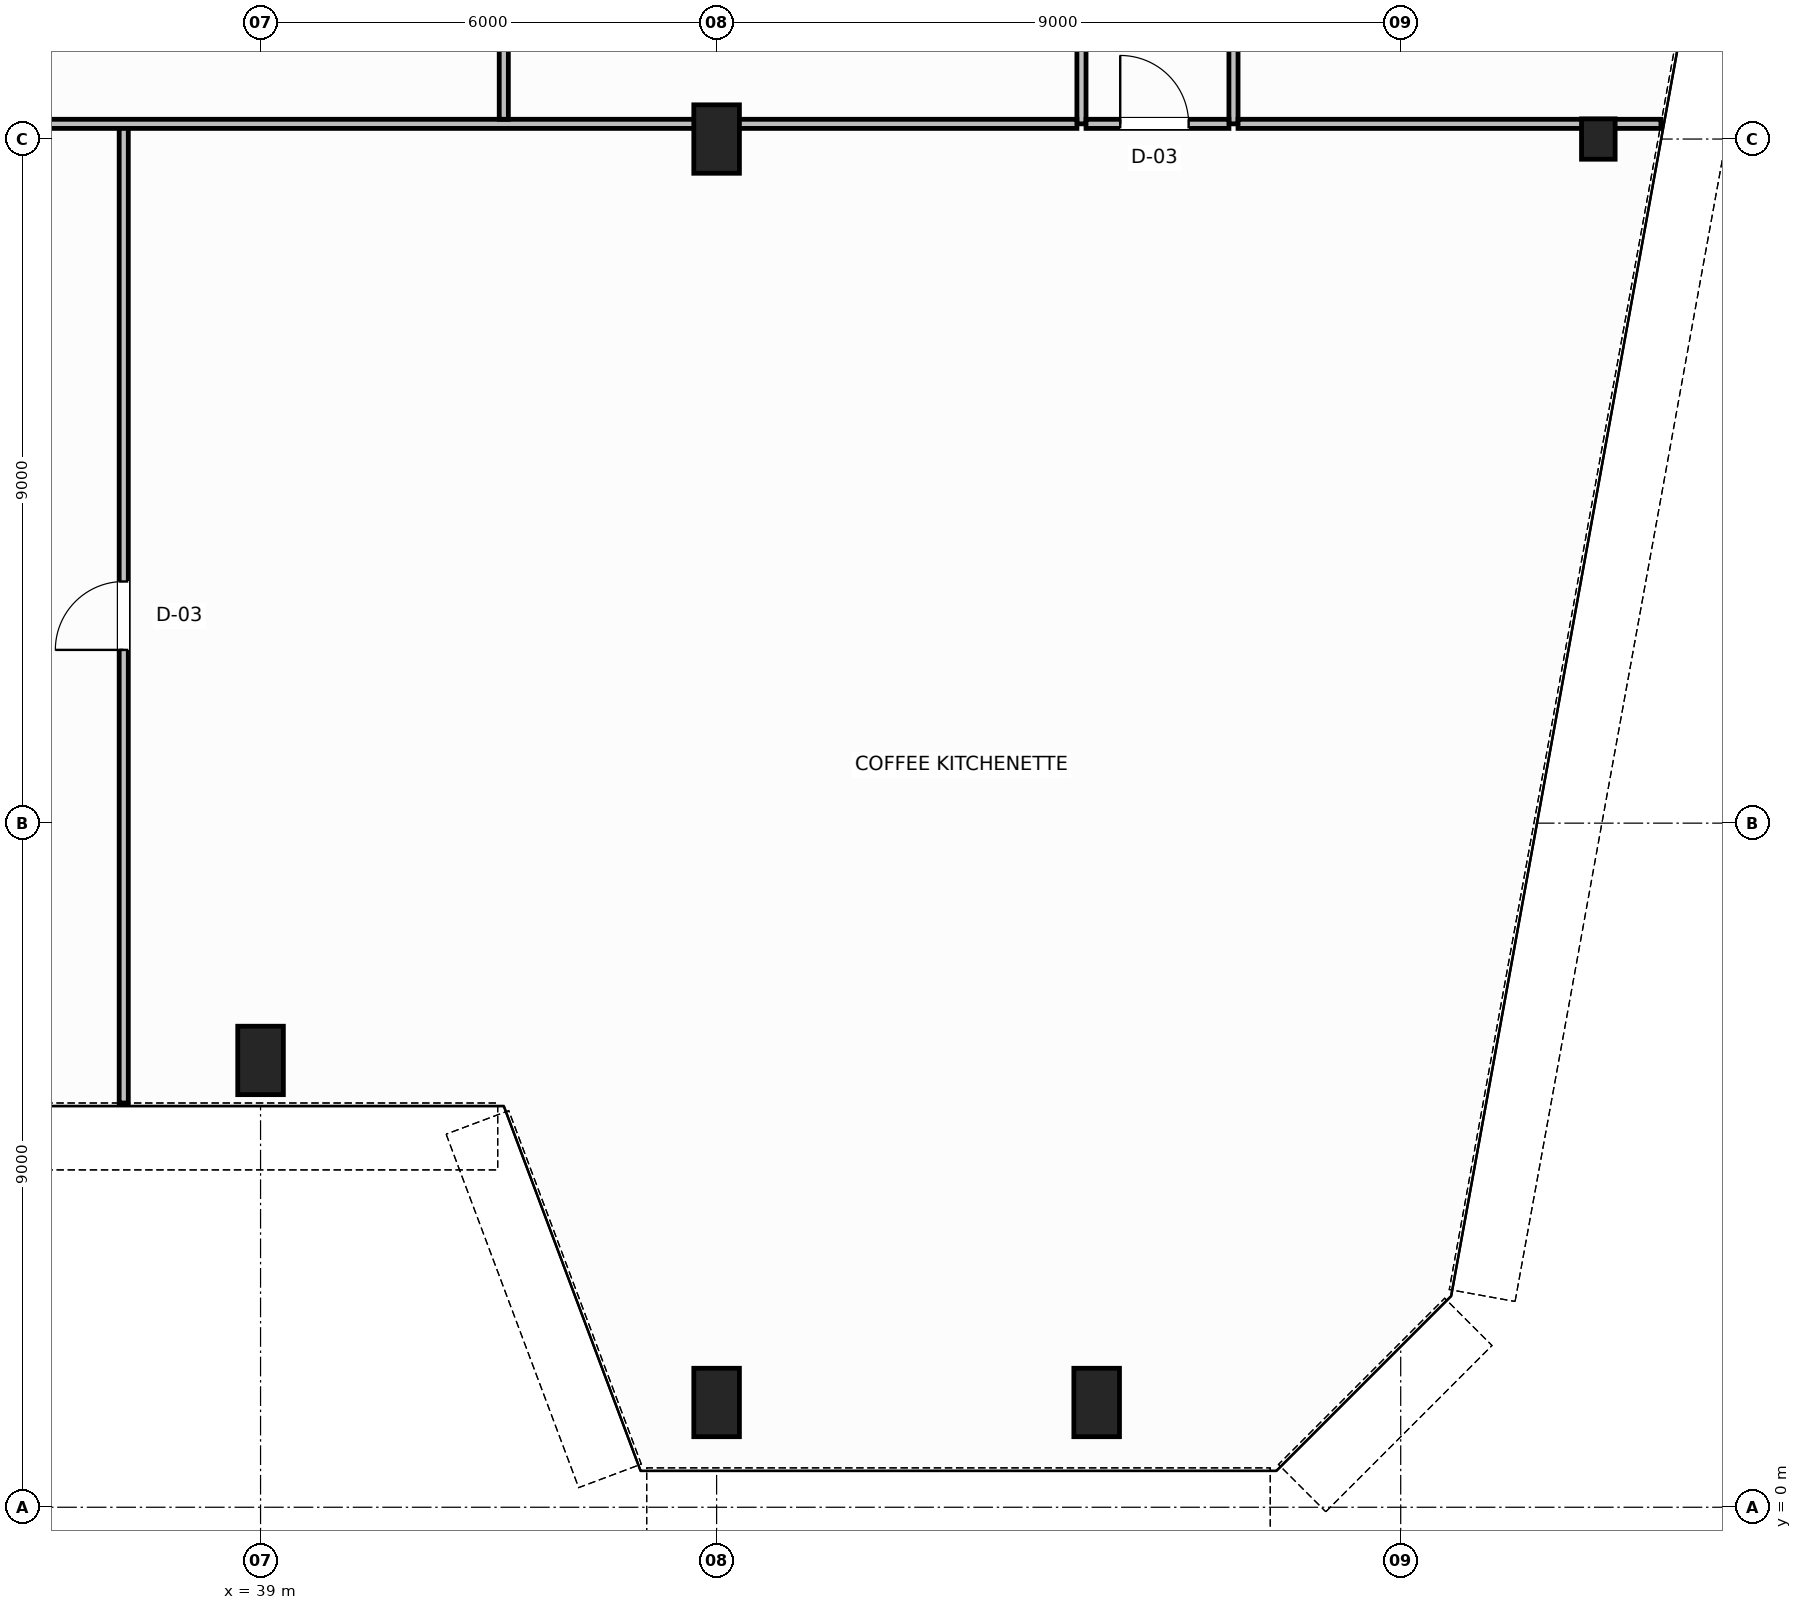
"""IFC4 building model, lengths in metres.
Left out: names, types, materials, properties, quantities, classifications, styles, units other than length and angle.
Written with IfcOpenShell. Run it as: python <this file> out.ifc"""

import sys

from ifc_helpers import new_model, si_unit, direction, frame, frame_2d, origin, origin_2d, place, context, subcontext, project, spatial, rectangle, hollow_rectangle, i_section, extrude, source, transform, mapped, element, fill, save


model = new_model("IFC4")
c1 = context("Model", 3, precision=1e-05, world=origin(), true_north=direction((0.0, 1.0)))
c2 = subcontext(c1, "Body", "Model", "MODEL_VIEW")
j1 = project(units=[si_unit("LENGTHUNIT", "METRE"), si_unit("PLANEANGLEUNIT", "RADIAN")], contexts=[c1])
p1 = place(None, origin())
s1 = spatial("IfcSite", under=j1, at=p1, CompositionType="ELEMENT")
p2 = place(p1, origin())
s2 = spatial("IfcBuilding", under=s1, at=p2, CompositionType="ELEMENT")
p3 = place(p2, frame((0.0, 0.0, 26.4)))
s3 = spatial("IfcBuildingStorey", under=s2, at=p3, CompositionType="ELEMENT", Elevation=26.4)
m1 = source(origin(), c2, "Body", "SweptSolid", [
    extrude(i_section(OverallWidth=0.442, OverallDepth=0.531, WebThickness=0.065, FlangeThickness=0.076, FilletRadius=0.015, at=origin_2d()), origin(), (0.0, 0.0, 1.0), 3.8),
])
p4 = place(p3, frame((56.6, 18.0, 0.0), z_axis=(0.0, 0.0, 1.0), x_axis=(1.0, 0.0, 0.0)))
e1 = element("IfcColumn", 1, at=p4, inside=s3, PredefinedType="COLUMN", context=c2, shape_type="MappedRepresentation", body=[
    mapped(m1, transform((0.0, 0.0, 0.0), scale=1.0)),
])
m2 = source(origin(), c2, "Body", "SweptSolid", [
    extrude(hollow_rectangle(XDim=0.6, YDim=0.9, WallThickness=0.04, InnerFilletRadius=0.04, OuterFilletRadius=0.08, at=origin_2d()), origin(), (0.0, 0.0, 1.0), 3.8),
])
p5 = place(p3, frame((45.0, 18.0, 0.0), z_axis=(0.0, 0.0, 1.0), x_axis=(1.0, 0.0, 0.0)))
e2 = element("IfcColumn", 2, at=p5, inside=s3, PredefinedType="COLUMN", context=c2, shape_type="MappedRepresentation", body=[
    mapped(m2, transform((0.0, 0.0, 0.0), scale=1.0)),
])
m3 = source(origin(), c2, "Body", "SweptSolid", [
    extrude(hollow_rectangle(XDim=0.6, YDim=0.9, WallThickness=0.04, InnerFilletRadius=0.04, OuterFilletRadius=0.08, at=origin_2d()), origin(), (0.0, 0.0, 1.0), 3.744),
])
for number, where, z_axis, x_axis in (
    (3, (39.0, 5.878, 0.032), (0.0, 0.064, 0.998), (-1.0, 0.0, 0.0)),
    (4, (45.0, 1.378, 0.032), (0.0, 0.064, 0.998), (-1.0, 0.0, 0.0)),
    (5, (50.0, 1.378, 0.032), (0.0, 0.064, 0.998), (-1.0, 0.0, 0.0)),
):
    element("IfcColumn", number, at=place(p3, frame(where, z_axis=z_axis, x_axis=x_axis)), inside=s3, PredefinedType="COLUMN", context=c2, shape_type="MappedRepresentation", body=[
        mapped(m3, transform((0.0, 0.0, 0.0), scale=1.0)),
    ])
p6 = place(p3, frame((49.8, 18.2, 0.0), z_axis=(0.0, 0.0, 1.0), x_axis=(0.0, 1.0, 0.0)))
e6 = element("IfcWall", 6, at=p6, inside=s3, PredefinedType="PARTITIONING", context=c2, shape_type="SweptSolid", body=[
    extrude(rectangle(XDim=15.84, YDim=0.12, at=frame_2d((7.92, 0.0))), origin(), (0.0, 0.0, 1.0), 3.58),
])
p7 = place(p3, frame((51.8, 18.2, 0.0), z_axis=(0.0, 0.0, 1.0), x_axis=(0.0, 1.0, 0.0)))
e7 = element("IfcWall", 7, at=p7, inside=s3, PredefinedType="PARTITIONING", context=c2, shape_type="SweptSolid", body=[
    extrude(rectangle(XDim=15.84, YDim=0.12, at=frame_2d((7.92, 0.0))), origin(), (0.0, 0.0, 1.0), 3.58),
])
p8 = place(p7, frame((4.15, 0.0, 0.0)))
e8 = element("IfcOpeningElement", 8, at=p8, cuts=e7, PredefinedType="OPENING", context=c2, shape_type="SweptSolid", body=[
    extrude(rectangle(XDim=0.9, YDim=2.15, at=frame_2d((0.45, 1.075))), frame((0.0, 0.07, 0.0), z_axis=(0.0, -1.0, 0.0), x_axis=(1.0, 0.0, 0.0)), (0.0, 0.0, 1.0), 0.14),
])
p9 = place(p7, frame((12.07, 0.0, 0.0)))
e9 = element("IfcOpeningElement", 9, at=p9, cuts=e7, PredefinedType="OPENING", context=c2, shape_type="SweptSolid", body=[
    extrude(rectangle(XDim=0.9, YDim=2.15, at=frame_2d((0.45, 1.075))), frame((0.0, 0.07, 0.0), z_axis=(0.0, -1.0, 0.0), x_axis=(1.0, 0.0, 0.0)), (0.0, 0.0, 1.0), 0.14),
])
p10 = place(p3, frame((49.86, 18.2, 0.0), z_axis=(0.0, 0.0, 1.0), x_axis=(1.0, 0.0, 0.0)))
e10 = element("IfcWall", 10, at=p10, inside=s3, PredefinedType="PARTITIONING", context=c2, shape_type="SweptSolid", body=[
    extrude(rectangle(XDim=1.88, YDim=0.12, at=frame_2d((0.94, 0.0))), origin(), (0.0, 0.0, 1.0), 2.77),
])
p11 = place(p10, frame((0.45, 0.0, 0.0)))
e11 = element("IfcOpeningElement", 11, at=p11, cuts=e10, PredefinedType="OPENING", context=c2, shape_type="SweptSolid", body=[
    extrude(rectangle(XDim=0.9, YDim=2.15, at=frame_2d((0.45, 1.075))), frame((0.0, 0.07, 0.0), z_axis=(0.0, -1.0, 0.0), x_axis=(1.0, 0.0, 0.0)), (0.0, 0.0, 1.0), 0.14),
])
p12 = place(p3, frame((51.86, 18.2, 0.0), z_axis=(0.0, 0.0, 1.0), x_axis=(1.0, 0.0, 0.0)))
e12 = element("IfcWall", 12, at=p12, inside=s3, PredefinedType="PARTITIONING", context=c2, shape_type="SweptSolid", body=[
    extrude(rectangle(XDim=5.563, YDim=0.12, at=frame_2d((2.782, 0.0))), origin(), (0.0, 0.0, 1.0), 2.77),
])
p13 = place(p3, frame((18.26, 18.2, 0.0), z_axis=(0.0, 0.0, 1.0), x_axis=(1.0, 0.0, 0.0)))
e13 = element("IfcWall", 13, at=p13, inside=s3, PredefinedType="PARTITIONING", context=c2, shape_type="SweptSolid", body=[
    extrude(rectangle(XDim=31.48, YDim=0.12, at=frame_2d((15.74, 0.0))), origin(), (0.0, 0.0, 1.0), 2.77),
])
p14 = place(p3, frame((42.2, 18.26, 0.0), z_axis=(0.0, 0.0, 1.0), x_axis=(0.0, 1.0, 0.0)))
e14 = element("IfcWall", 14, at=p14, inside=s3, PredefinedType="PARTITIONING", context=c2, shape_type="SweptSolid", body=[
    extrude(rectangle(XDim=15.78, YDim=0.12, at=frame_2d((7.89, 0.0))), origin(), (0.0, 0.0, 1.0), 3.58),
])
p15 = place(p3, frame((37.2, 5.318, 0.0), z_axis=(0.0, 0.0, 1.0), x_axis=(0.0, 1.0, 0.0)))
e15 = element("IfcWall", 15, at=p15, inside=s3, PredefinedType="PARTITIONING", context=c2, shape_type="SweptSolid", body=[
    extrude(rectangle(XDim=12.822, YDim=0.12, at=frame_2d((6.411, 0.0))), origin(), (0.0, 0.0, 1.0), 3.58),
])
p16 = place(p15, frame((5.961, 0.0, 0.0)))
e16 = element("IfcOpeningElement", 16, at=p16, cuts=e15, PredefinedType="OPENING", context=c2, shape_type="SweptSolid", body=[
    extrude(rectangle(XDim=0.9, YDim=2.15, at=frame_2d((0.45, 1.075))), frame((0.0, 0.07, 0.0), z_axis=(0.0, -1.0, 0.0), x_axis=(1.0, 0.0, 0.0)), (0.0, 0.0, 1.0), 0.14),
])
m4 = source(origin(), c2, "Body", "SweptSolid", [
    extrude(rectangle(XDim=0.9, YDim=2.15, at=frame_2d((0.45, 1.075))), frame((0.0, 0.025, 0.0), z_axis=(0.0, -1.0, 0.0), x_axis=(1.0, 0.0, 0.0)), (0.0, 0.0, 1.0), 0.05),
])
p17 = place(p16, origin())
e17 = element("IfcDoor", 17, at=p17, inside=s3, OperationType="SINGLE_SWING_RIGHT", PredefinedType="DOOR", context=c2, shape_type="MappedRepresentation", body=[
    mapped(m4, transform((0.0, 0.0, 0.0), scale=1.0)),
])
fill(e16, e17)
p18 = place(p11, origin())
e18 = element("IfcDoor", 18, at=p18, inside=s3, OperationType="SINGLE_SWING_RIGHT", PredefinedType="DOOR", context=c2, shape_type="MappedRepresentation", body=[
    mapped(m4, transform((0.0, 0.0, 0.0), scale=1.0)),
])
fill(e11, e18)
save(model, sys.argv[1])
